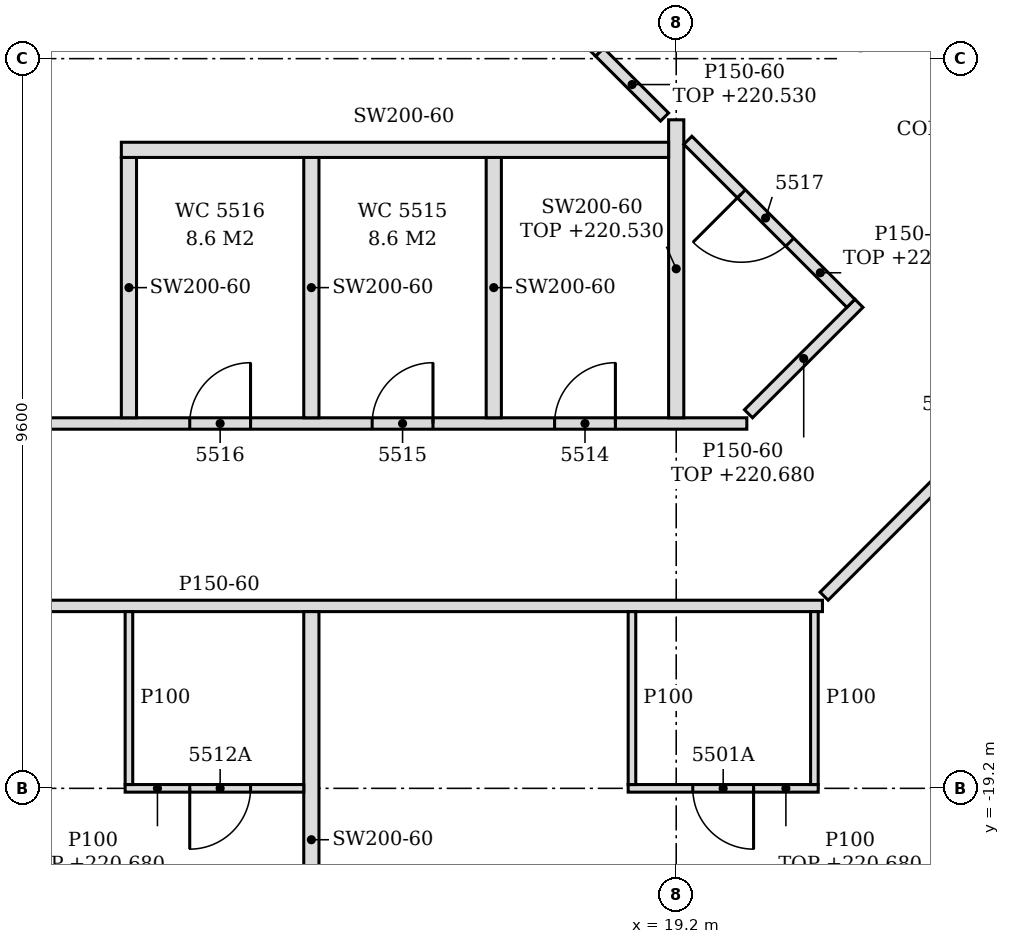
"""IFC4 building model, lengths in metres.
Left out: names, types, materials, properties, quantities, classifications, styles, units other than length and angle.
Written with IfcOpenShell. Run it as: python <this file> out.ifc"""

import sys

from ifc_helpers import new_model, si_unit, direction, frame, frame_2d, origin, place, context, subcontext, project, spatial, polyline, rectangle, outline, extrude, element, fill, save


model = new_model("IFC4")
c1 = context("Model", 3, precision=1e-05, world=origin(), true_north=direction((0.0, 1.0)))
c2 = subcontext(c1, "Body", "Model", "MODEL_VIEW")
j1 = project(units=[si_unit("LENGTHUNIT", "METRE"), si_unit("PLANEANGLEUNIT", "RADIAN")], contexts=[c1])
p1 = place(None, origin())
s1 = spatial("IfcSite", under=j1, at=p1, CompositionType="ELEMENT")
p2 = place(p1, origin())
s2 = spatial("IfcBuilding", under=s1, at=p2, CompositionType="ELEMENT")
p3 = place(p2, frame((0.0, 0.0, 217.8)))
s3 = spatial("IfcBuildingStorey", under=s2, at=p3, CompositionType="ELEMENT", Elevation=217.8)
p4 = place(p3, frame((14.4, -22.877, 0.0), z_axis=(0.0, 0.0, 1.0), x_axis=(0.0, 1.0, 0.0)))
e1 = element("IfcWall", 1, at=p4, inside=s3, PredefinedType="PARTITIONING", context=c2, shape_type="SweptSolid", body=[
    extrude(outline(polyline([(0.0, 0.0), (6.002, 0.0), (6.002, 3.45), (3.782, 3.45), (3.78, 2.88), (3.572, 2.88), (3.57, 3.45), (0.0, 3.45), (0.0, 0.0)])), frame((0.0, 0.1, 0.0), z_axis=(0.0, -1.0, 0.0), x_axis=(1.0, 0.0, 0.0)), (0.0, 0.0, 1.0), 0.2),
])
p5 = place(p3, frame((11.95, -19.2, 0.0), z_axis=(0.0, 0.0, 1.0), x_axis=(1.0, 0.0, 0.0)))
e2 = element("IfcWall", 2, at=p5, inside=s3, PredefinedType="PARTITIONING", context=c2, shape_type="SweptSolid", body=[
    extrude(rectangle(XDim=2.35, YDim=0.1, at=frame_2d((1.175, 0.0))), origin(), (0.0, 0.0, 1.0), 2.88),
])
p6 = place(p5, frame((0.85, 0.0, 0.0)))
e3 = element("IfcOpeningElement", 3, at=p6, cuts=e2, PredefinedType="OPENING", context=c2, shape_type="SweptSolid", body=[
    extrude(rectangle(XDim=0.8, YDim=2.1, at=frame_2d((0.4, 1.05))), frame((0.0, 0.06, 0.0), z_axis=(0.0, -1.0, 0.0), x_axis=(1.0, 0.0, 0.0)), (0.0, 0.0, 1.0), 0.12),
])
p7 = place(p3, frame((18.568, -19.2, 0.0), z_axis=(0.0, 0.0, 1.0), x_axis=(1.0, 0.0, 0.0)))
e4 = element("IfcWall", 4, at=p7, inside=s3, PredefinedType="PARTITIONING", context=c2, shape_type="SweptSolid", body=[
    extrude(outline(polyline([(0.0, 0.0), (2.5, 0.0), (2.5, 2.88), (0.782, 2.88), (0.78, 2.73), (0.482, 2.73), (0.48, 2.88), (0.0, 2.88), (0.0, 0.0)])), frame((0.0, 0.05, 0.0), z_axis=(0.0, -1.0, 0.0), x_axis=(1.0, 0.0, 0.0)), (0.0, 0.0, 1.0), 0.1),
])
p8 = place(p7, frame((0.85, 0.0, 0.0)))
e5 = element("IfcOpeningElement", 5, at=p8, cuts=e4, PredefinedType="OPENING", context=c2, shape_type="SweptSolid", body=[
    extrude(rectangle(XDim=0.8, YDim=2.1, at=frame_2d((0.4, 1.05))), frame((0.0, 0.06, 0.0), z_axis=(0.0, -1.0, 0.0), x_axis=(1.0, 0.0, 0.0)), (0.0, 0.0, 1.0), 0.12),
])
for number, where, z_axis, x_axis in (
    (6, (12.0, -19.15, 0.0), (0.0, 0.0, 1.0), (0.0, 1.0, 0.0)),
    (7, (18.618, -19.15, 0.0), (0.0, 0.0, 1.0), (0.0, 1.0, 0.0)),
):
    element("IfcWall", number, at=place(p3, frame(where, z_axis=z_axis, x_axis=x_axis)), inside=s3, PredefinedType="PARTITIONING", context=c2, shape_type="SweptSolid", body=[
        extrude(outline(polyline([(0.0, 0.0), (2.275, 0.0), (2.275, 3.45), (0.055, 3.45), (0.053, 2.88), (0.0, 2.88), (0.0, 0.0)])), frame((0.0, 0.05, 0.0), z_axis=(0.0, -1.0, 0.0), x_axis=(1.0, 0.0, 0.0)), (0.0, 0.0, 1.0), 0.1),
    ])
p9 = place(p3, frame((21.018, -19.15, 0.0), z_axis=(0.0, 0.0, 1.0), x_axis=(0.0, 1.0, 0.0)))
e8 = element("IfcWall", 8, at=p9, inside=s3, PredefinedType="PARTITIONING", context=c2, shape_type="SweptSolid", body=[
    extrude(outline(polyline([(0.0, 0.0), (2.275, 0.0), (2.275, 3.45), (0.045, 3.45), (0.043, 2.98), (0.0, 2.98), (0.0, 0.0)])), frame((0.0, 0.05, 0.0), z_axis=(0.0, -1.0, 0.0), x_axis=(1.0, 0.0, 0.0)), (0.0, 0.0, 1.0), 0.1),
])
p10 = place(p3, frame((-0.844, -16.8, 0.0), z_axis=(0.0, 0.0, 1.0), x_axis=(1.0, 0.0, 0.0)))
e9 = element("IfcWall", 9, at=p10, inside=s3, PredefinedType="PARTITIONING", context=c2, shape_type="SweptSolid", body=[
    extrude(outline(polyline([(0.0, 0.0), (21.968, 0.0), (21.968, 3.45), (20.194, 3.45), (20.191, 2.73), (19.894, 2.73), (19.892, 3.45), (8.194, 3.45), (8.191, 2.73), (7.894, 2.73), (7.892, 3.45), (0.0, 3.45), (0.0, 0.0)])), frame((0.0, 0.075, 0.0), z_axis=(0.0, -1.0, 0.0), x_axis=(1.0, 0.0, 0.0)), (0.0, 0.0, 1.0), 0.15),
])
p11 = place(p10, frame((5.194, 0.0, 0.0)))
e10 = element("IfcOpeningElement", 10, at=p11, cuts=e9, PredefinedType="OPENING", context=c2, shape_type="SweptSolid", body=[
    extrude(rectangle(XDim=0.9, YDim=2.1, at=frame_2d((0.45, 1.05))), frame((0.0, 0.085, 0.0), z_axis=(0.0, -1.0, 0.0), x_axis=(1.0, 0.0, 0.0)), (0.0, 0.0, 1.0), 0.17),
])
p12 = place(p3, frame((21.146, -16.672, 0.0), z_axis=(0.0, 0.0, 1.0), x_axis=(0.707100999376, 0.70711256295, 0.0)))
e11 = element("IfcWall", 11, at=p12, inside=s3, PredefinedType="PARTITIONING", context=c2, shape_type="SweptSolid", body=[
    extrude(rectangle(XDim=21.113, YDim=0.15, at=frame_2d((10.556, 0.0))), origin(), (0.0, 0.0, 1.0), 2.88),
])
p13 = place(p12, frame((2.466, 0.0, 0.0)))
e12 = element("IfcOpeningElement", 12, at=p13, cuts=e11, PredefinedType="OPENING", context=c2, shape_type="SweptSolid", body=[
    extrude(rectangle(XDim=0.9, YDim=2.1, at=frame_2d((0.45, 1.05))), frame((0.0, 0.085, 0.0), z_axis=(0.0, -1.0, 0.0), x_axis=(1.0, 0.0, 0.0)), (0.0, 0.0, 1.0), 0.17),
])
p14 = place(p12, frame((8.611, 0.0, 0.0)))
e13 = element("IfcOpeningElement", 13, at=p14, cuts=e11, PredefinedType="OPENING", context=c2, shape_type="SweptSolid", body=[
    extrude(rectangle(XDim=0.9, YDim=2.1, at=frame_2d((0.45, 1.05))), frame((0.0, 0.085, 0.0), z_axis=(0.0, -1.0, 0.0), x_axis=(1.0, 0.0, 0.0)), (0.0, 0.0, 1.0), 0.17),
])
p15 = place(p12, frame((13.012, 0.0, 0.0)))
e14 = element("IfcOpeningElement", 14, at=p15, cuts=e11, PredefinedType="OPENING", context=c2, shape_type="SweptSolid", body=[
    extrude(rectangle(XDim=0.9, YDim=2.1, at=frame_2d((0.45, 1.05))), frame((0.0, 0.085, 0.0), z_axis=(0.0, -1.0, 0.0), x_axis=(1.0, 0.0, 0.0)), (0.0, 0.0, 1.0), 0.17),
])
p16 = place(p12, frame((16.261, 0.0, 0.0)))
e15 = element("IfcOpeningElement", 15, at=p16, cuts=e11, PredefinedType="OPENING", context=c2, shape_type="SweptSolid", body=[
    extrude(rectangle(XDim=0.9, YDim=2.1, at=frame_2d((0.45, 1.05))), frame((0.0, 0.085, 0.0), z_axis=(0.0, -1.0, 0.0), x_axis=(1.0, 0.0, 0.0)), (0.0, 0.0, 1.0), 0.17),
])
p17 = place(p3, frame((2.325, -14.4, 0.0), z_axis=(0.0, 0.0, 1.0), x_axis=(1.0, 0.0, 0.0)))
e16 = element("IfcWall", 16, at=p17, inside=s3, PredefinedType="PARTITIONING", context=c2, shape_type="SweptSolid", body=[
    extrude(outline(polyline([(0.0, 0.0), (17.804, 0.0), (17.804, 2.88), (17.025, 2.88), (17.023, 2.73), (16.725, 2.73), (16.723, 2.88), (5.025, 2.88), (5.023, 2.73), (4.725, 2.73), (4.723, 2.88), (0.0, 2.88), (0.0, 0.0)])), frame((0.0, 0.075, 0.0), z_axis=(0.0, -1.0, 0.0), x_axis=(1.0, 0.0, 0.0)), (0.0, 0.0, 1.0), 0.15),
])
p18 = place(p17, frame((15.275, 0.0, 0.0)))
e17 = element("IfcOpeningElement", 17, at=p18, cuts=e16, PredefinedType="OPENING", context=c2, shape_type="SweptSolid", body=[
    extrude(rectangle(XDim=0.8, YDim=2.1, at=frame_2d((0.4, 1.05))), frame((0.0, 0.085, 0.0), z_axis=(0.0, -1.0, 0.0), x_axis=(1.0, 0.0, 0.0)), (0.0, 0.0, 1.0), 0.17),
])
p19 = place(p17, frame((12.875, 0.0, 0.0)))
e18 = element("IfcOpeningElement", 18, at=p19, cuts=e16, PredefinedType="OPENING", context=c2, shape_type="SweptSolid", body=[
    extrude(rectangle(XDim=0.8, YDim=2.1, at=frame_2d((0.4, 1.05))), frame((0.0, 0.085, 0.0), z_axis=(0.0, -1.0, 0.0), x_axis=(1.0, 0.0, 0.0)), (0.0, 0.0, 1.0), 0.17),
])
p20 = place(p17, frame((10.475, 0.0, 0.0)))
e19 = element("IfcOpeningElement", 19, at=p20, cuts=e16, PredefinedType="OPENING", context=c2, shape_type="SweptSolid", body=[
    extrude(rectangle(XDim=0.8, YDim=2.1, at=frame_2d((0.4, 1.05))), frame((0.0, 0.085, 0.0), z_axis=(0.0, -1.0, 0.0), x_axis=(1.0, 0.0, 0.0)), (0.0, 0.0, 1.0), 0.17),
])
for number, where, z_axis, x_axis in (
    (20, (12.0, -14.325, 0.0), (0.0, 0.0, 1.0), (0.0, 1.0, 0.0)),
    (21, (14.4, -14.325, 0.0), (0.0, 0.0, 1.0), (0.0, 1.0, 0.0)),
    (22, (16.8, -14.325, 0.0), (0.0, 0.0, 1.0), (0.0, 1.0, 0.0)),
):
    element("IfcWall", number, at=place(p3, frame(where, z_axis=z_axis, x_axis=x_axis)), inside=s3, PredefinedType="PARTITIONING", context=c2, shape_type="SweptSolid", body=[
        extrude(outline(polyline([(0.0, 0.0), (3.425, 0.0), (3.425, 3.45), (0.03, 3.45), (0.028, 2.88), (0.0, 2.88), (0.0, 0.0)])), frame((0.0, 0.1, 0.0), z_axis=(0.0, -1.0, 0.0), x_axis=(1.0, 0.0, 0.0)), (0.0, 0.0, 1.0), 0.2),
    ])
p21 = place(p3, frame((19.2, -14.325, 0.0), z_axis=(0.0, 0.0, 1.0), x_axis=(0.0, 1.0, 0.0)))
e23 = element("IfcWall", 23, at=p21, inside=s3, PredefinedType="PARTITIONING", context=c2, shape_type="SweptSolid", body=[
    extrude(rectangle(XDim=3.92, YDim=0.2, at=frame_2d((1.96, 0.0))), origin(), (0.0, 0.0, 1.0), 2.73),
])
p22 = place(p3, frame((20.151, -14.272, 0.0), z_axis=(0.0, 0.0, 1.0), x_axis=(0.707106781187, 0.707106781187, 0.0)))
e24 = element("IfcWall", 24, at=p22, inside=s3, PredefinedType="PARTITIONING", context=c2, shape_type="SweptSolid", body=[
    extrude(rectangle(XDim=2.055, YDim=0.15, at=frame_2d((1.027, 0.0))), origin(), (0.0, 0.0, 1.0), 2.88),
])
p23 = place(p3, frame((21.498, -12.819, 0.0), z_axis=(0.0, 0.0, 1.0), x_axis=(-0.707106781187, 0.707106781187, 0.0)))
e25 = element("IfcWall", 25, at=p23, inside=s3, PredefinedType="PARTITIONING", context=c2, shape_type="SweptSolid", body=[
    extrude(rectangle(XDim=3.033, YDim=0.15, at=frame_2d((1.517, 0.0))), origin(), (0.0, 0.0, 1.0), 2.73),
])
p24 = place(p23, frame((1.137, 0.0, 0.0)))
e26 = element("IfcOpeningElement", 26, at=p24, cuts=e25, PredefinedType="OPENING", context=c2, shape_type="SweptSolid", body=[
    extrude(rectangle(XDim=0.9, YDim=2.1, at=frame_2d((0.45, 1.05))), frame((0.0, 0.085, 0.0), z_axis=(0.0, -1.0, 0.0), x_axis=(1.0, 0.0, 0.0)), (0.0, 0.0, 1.0), 0.17),
])
p25 = place(p3, frame((11.9, -10.8, 0.0), z_axis=(0.0, 0.0, 1.0), x_axis=(1.0, 0.0, 0.0)))
e27 = element("IfcWall", 27, at=p25, inside=s3, PredefinedType="PARTITIONING", context=c2, shape_type="SweptSolid", body=[
    extrude(outline(polyline([(0.0, 0.0), (7.2, 0.0), (7.2, 2.73), (7.15, 2.73), (7.148, 3.45), (0.0, 3.45), (0.0, 0.0)])), frame((0.0, 0.1, 0.0), z_axis=(0.0, -1.0, 0.0), x_axis=(1.0, 0.0, 0.0)), (0.0, 0.0, 1.0), 0.2),
])
p26 = place(p3, frame((19.047, -10.368, 0.0), z_axis=(0.0, 0.0, 1.0), x_axis=(-0.707409718716, 0.706803713817, 0.0)))
e28 = element("IfcWall", 28, at=p26, inside=s3, PredefinedType="PARTITIONING", context=c2, shape_type="SweptSolid", body=[
    extrude(rectangle(XDim=1.208, YDim=0.15, at=frame_2d((0.604, 0.0))), origin(), (0.0, 0.0, 1.0), 2.73),
])
p27 = place(p3, frame((18.086, -9.514, 0.0), z_axis=(0.0, 0.0, 1.0), x_axis=(0.707106781187, 0.707106781187, 0.0)))
e29 = element("IfcWall", 29, at=p27, inside=s3, PredefinedType="PARTITIONING", context=c2, shape_type="SweptSolid", body=[
    extrude(rectangle(XDim=1.295, YDim=0.15, at=frame_2d((0.648, 0.0))), origin(), (0.0, 0.0, 1.0), 3.45),
])
p28 = place(p8, frame((0.8, 0.0, 0.0), z_axis=(0.0, 0.0, 1.0), x_axis=(-1.0, 0.0, 0.0)))
e30 = element("IfcDoor", 30, at=p28, inside=s3, OperationType="SINGLE_SWING_LEFT", PredefinedType="DOOR", context=c2, shape_type="SweptSolid", body=[
    extrude(rectangle(XDim=0.8, YDim=2.1, at=frame_2d((0.4, 1.05))), frame((0.0, 0.025, 0.0), z_axis=(0.0, -1.0, 0.0), x_axis=(1.0, 0.0, 0.0)), (0.0, 0.0, 1.0), 0.05),
])
fill(e5, e30)
p29 = place(p6, frame((0.8, 0.0, 0.0), z_axis=(0.0, 0.0, 1.0), x_axis=(-1.0, 0.0, 0.0)))
e31 = element("IfcDoor", 31, at=p29, inside=s3, OperationType="SINGLE_SWING_RIGHT", PredefinedType="DOOR", context=c2, shape_type="SweptSolid", body=[
    extrude(rectangle(XDim=0.8, YDim=2.1, at=frame_2d((0.4, 1.05))), frame((0.0, 0.025, 0.0), z_axis=(0.0, -1.0, 0.0), x_axis=(1.0, 0.0, 0.0)), (0.0, 0.0, 1.0), 0.05),
])
fill(e3, e31)
p30 = place(p18, origin())
e32 = element("IfcDoor", 32, at=p30, inside=s3, OperationType="SINGLE_SWING_RIGHT", PredefinedType="DOOR", context=c2, shape_type="SweptSolid", body=[
    extrude(rectangle(XDim=0.8, YDim=2.1, at=frame_2d((0.4, 1.05))), frame((0.0, 0.025, 0.0), z_axis=(0.0, -1.0, 0.0), x_axis=(1.0, 0.0, 0.0)), (0.0, 0.0, 1.0), 0.05),
])
fill(e17, e32)
p31 = place(p19, origin())
e33 = element("IfcDoor", 33, at=p31, inside=s3, OperationType="SINGLE_SWING_RIGHT", PredefinedType="DOOR", context=c2, shape_type="SweptSolid", body=[
    extrude(rectangle(XDim=0.8, YDim=2.1, at=frame_2d((0.4, 1.05))), frame((0.0, 0.025, 0.0), z_axis=(0.0, -1.0, 0.0), x_axis=(1.0, 0.0, 0.0)), (0.0, 0.0, 1.0), 0.05),
])
fill(e18, e33)
p32 = place(p20, origin())
e34 = element("IfcDoor", 34, at=p32, inside=s3, OperationType="SINGLE_SWING_RIGHT", PredefinedType="DOOR", context=c2, shape_type="SweptSolid", body=[
    extrude(rectangle(XDim=0.8, YDim=2.1, at=frame_2d((0.4, 1.05))), frame((0.0, 0.025, 0.0), z_axis=(0.0, -1.0, 0.0), x_axis=(1.0, 0.0, 0.0)), (0.0, 0.0, 1.0), 0.05),
])
fill(e19, e34)
p33 = place(p24, origin())
e35 = element("IfcDoor", 35, at=p33, inside=s3, OperationType="SINGLE_SWING_RIGHT", PredefinedType="DOOR", context=c2, shape_type="SweptSolid", body=[
    extrude(rectangle(XDim=0.9, YDim=2.1, at=frame_2d((0.45, 1.05))), frame((0.0, 0.025, 0.0), z_axis=(0.0, -1.0, 0.0), x_axis=(1.0, 0.0, 0.0)), (0.0, 0.0, 1.0), 0.05),
])
fill(e26, e35)
save(model, sys.argv[1])
